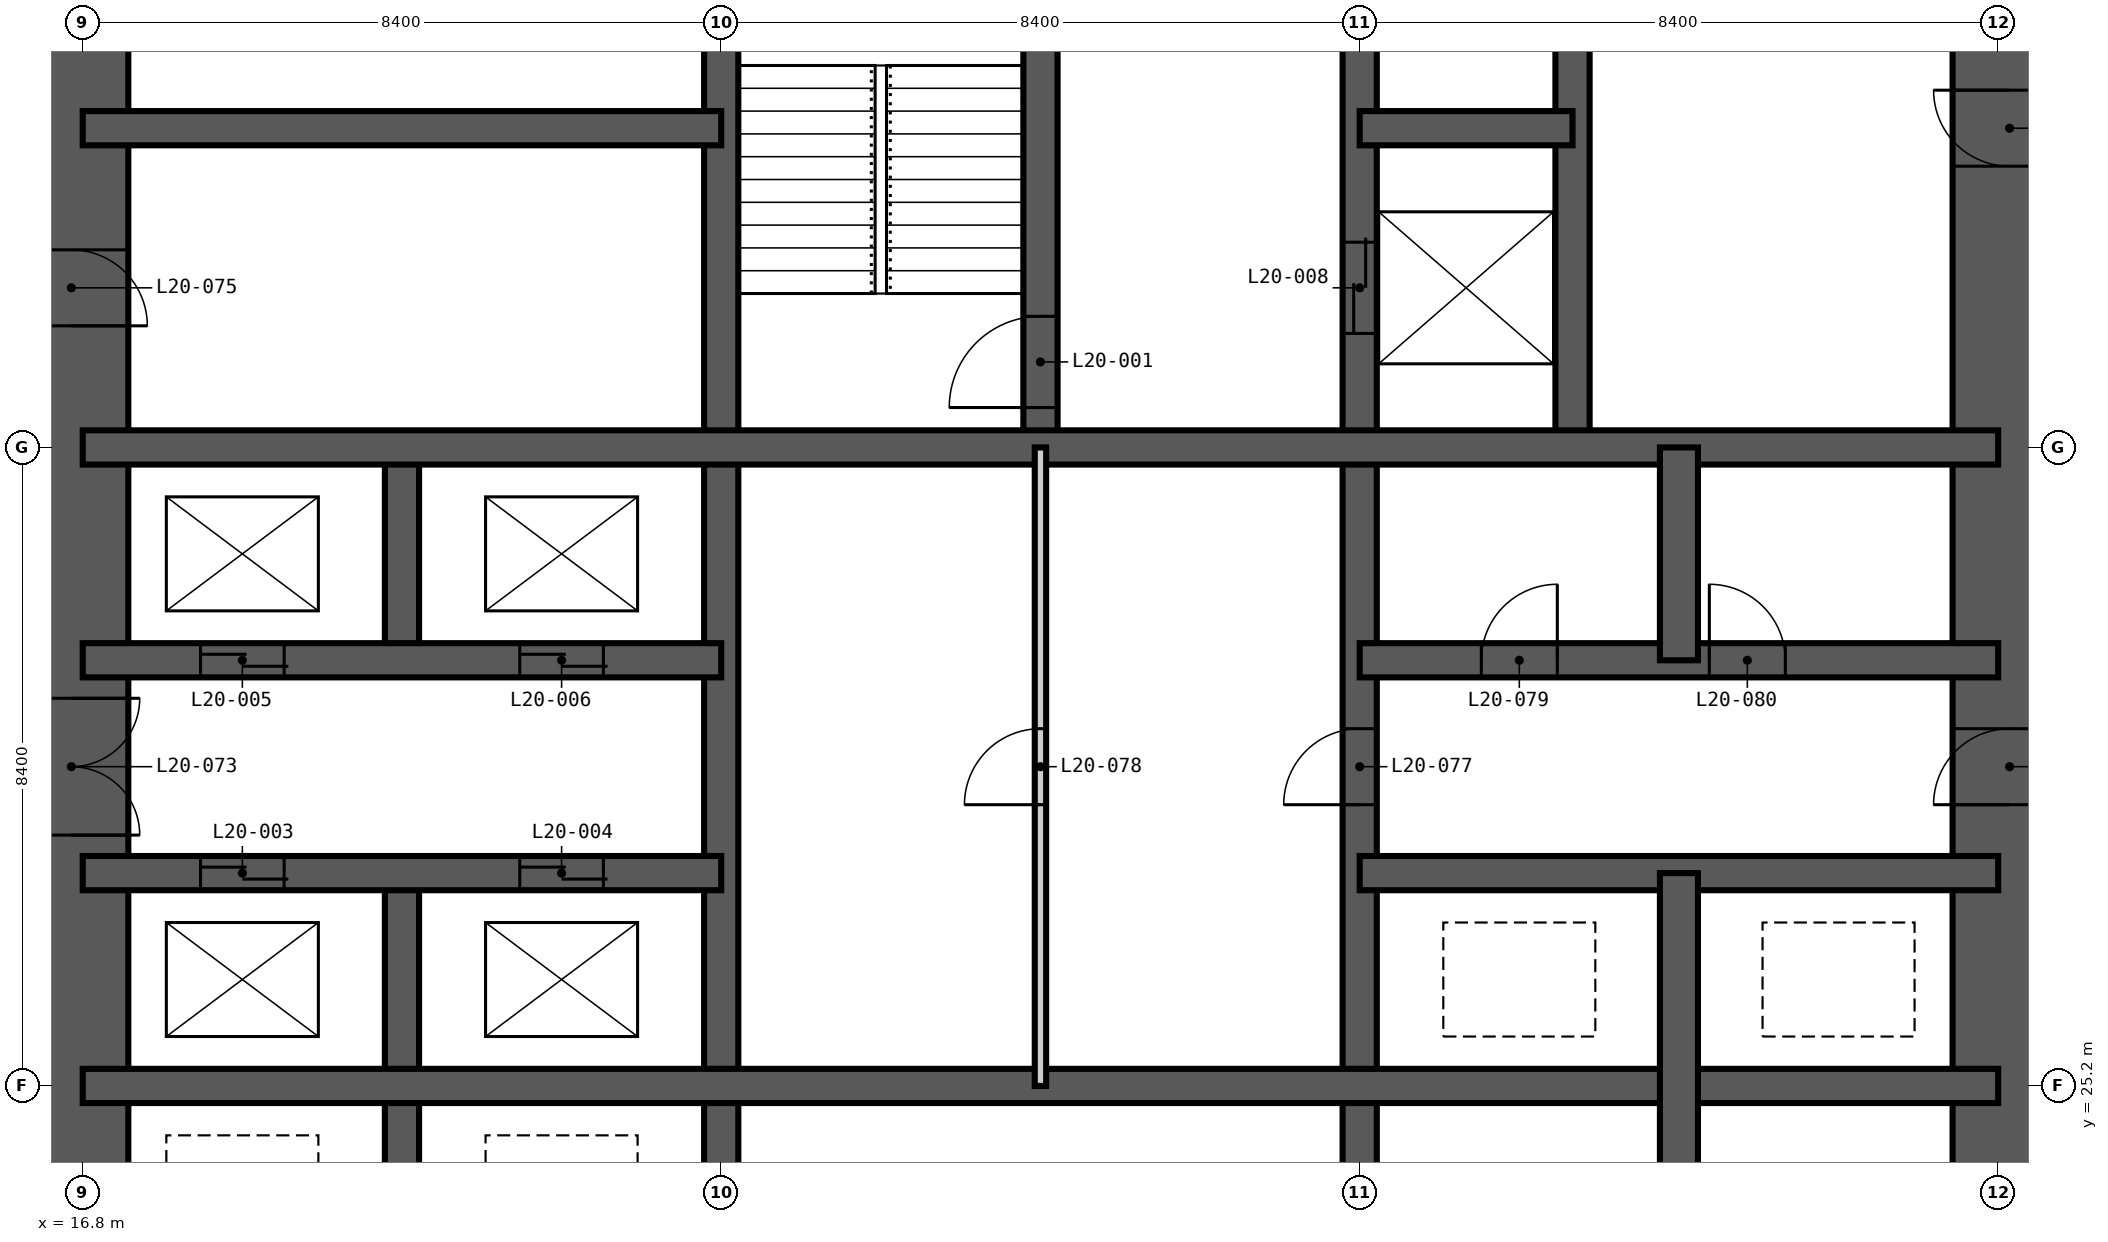
"""IFC4 building model, lengths in metres.
Left out: names, types, materials, properties, quantities, classifications, styles, units other than length and angle.
Written with IfcOpenShell. Run it as: python <this file> out.ifc"""

import sys

from ifc_helpers import new_model, si_unit, direction, frame, frame_2d, origin, place, context, subcontext, project, spatial, rectangle, extrude, element, fill, save


model = new_model("IFC4")
c1 = context("Model", 3, precision=1e-05, world=origin(), true_north=direction((0.0, 1.0)))
c2 = subcontext(c1, "Body", "Model", "MODEL_VIEW")
j1 = project(units=[si_unit("LENGTHUNIT", "METRE"), si_unit("PLANEANGLEUNIT", "RADIAN")], contexts=[c1])
p1 = place(None, origin())
s1 = spatial("IfcSite", under=j1, at=p1, CompositionType="ELEMENT")
p2 = place(p1, origin())
s2 = spatial("IfcBuilding", under=s1, at=p2, CompositionType="ELEMENT")
p3 = place(p2, frame((0.0, 0.0, 81.0)))
s3 = spatial("IfcBuildingStorey", under=s2, at=p3, CompositionType="ELEMENT", Elevation=81.0)
p4 = place(p3, frame((42.15, 17.4, -0.35), z_axis=(0.0, 0.0, 1.0), x_axis=(0.0, 1.0, 0.0)))
e1 = element("IfcWall", 1, at=p4, inside=s3, PredefinedType="SHEAR", context=c2, shape_type="SweptSolid", body=[
    extrude(rectangle(XDim=24.0, YDim=1.5, at=frame_2d((12.0, 0.0))), origin(), (0.0, 0.0, 1.0), 3.6),
])
p5 = place(p4, frame((0.2, 0.0, 0.35)))
e2 = element("IfcOpeningElement", 2, at=p5, cuts=e1, PredefinedType="OPENING", context=c2, shape_type="SweptSolid", body=[
    extrude(rectangle(XDim=1.2, YDim=2.2, at=frame_2d((0.6, 1.1))), frame((0.0, 0.76, 0.0), z_axis=(0.0, -1.0, 0.0), x_axis=(1.0, 0.0, 0.0)), (0.0, 0.0, 1.0), 1.52),
])
p6 = place(p4, frame((11.5, 0.0, 0.35)))
e3 = element("IfcOpeningElement", 3, at=p6, cuts=e1, PredefinedType="OPENING", context=c2, shape_type="SweptSolid", body=[
    extrude(rectangle(XDim=1.0, YDim=2.1, at=frame_2d((0.5, 1.05))), frame((0.0, 0.76, 0.0), z_axis=(0.0, -1.0, 0.0), x_axis=(1.0, 0.0, 0.0)), (0.0, 0.0, 1.0), 1.52),
])
p7 = place(p4, frame((19.9, 0.0, 0.35)))
e4 = element("IfcOpeningElement", 4, at=p7, cuts=e1, PredefinedType="OPENING", context=c2, shape_type="SweptSolid", body=[
    extrude(rectangle(XDim=1.0, YDim=2.1, at=frame_2d((0.5, 1.05))), frame((0.0, 0.76, 0.0), z_axis=(0.0, -1.0, 0.0), x_axis=(1.0, 0.0, 0.0)), (0.0, 0.0, 1.0), 1.52),
])
p8 = place(p3, frame((16.65, 41.4, -0.35), z_axis=(0.0, 0.0, 1.0), x_axis=(0.0, -1.0, 0.0)))
e5 = element("IfcWall", 5, at=p8, inside=s3, PredefinedType="SHEAR", context=c2, shape_type="SweptSolid", body=[
    extrude(rectangle(XDim=24.0, YDim=1.5, at=frame_2d((12.0, 0.0))), origin(), (0.0, 0.0, 1.0), 3.6),
])
p9 = place(p8, frame((11.1, 0.0, 0.35)))
e6 = element("IfcOpeningElement", 6, at=p9, cuts=e5, PredefinedType="OPENING", context=c2, shape_type="SweptSolid", body=[
    extrude(rectangle(XDim=1.8, YDim=2.2, at=frame_2d((0.9, 1.1))), frame((0.0, 0.76, 0.0), z_axis=(0.0, -1.0, 0.0), x_axis=(1.0, 0.0, 0.0)), (0.0, 0.0, 1.0), 1.52),
])
p10 = place(p8, frame((19.9, 0.0, 0.35)))
e7 = element("IfcOpeningElement", 7, at=p10, cuts=e5, PredefinedType="OPENING", context=c2, shape_type="SweptSolid", body=[
    extrude(rectangle(XDim=1.0, YDim=2.1, at=frame_2d((0.5, 1.05))), frame((0.0, 0.76, 0.0), z_axis=(0.0, -1.0, 0.0), x_axis=(1.0, 0.0, 0.0)), (0.0, 0.0, 1.0), 1.52),
])
p11 = place(p8, frame((5.2, 0.0, 0.35)))
e8 = element("IfcOpeningElement", 8, at=p11, cuts=e5, PredefinedType="OPENING", context=c2, shape_type="SweptSolid", body=[
    extrude(rectangle(XDim=1.0, YDim=2.1, at=frame_2d((0.5, 1.05))), frame((0.0, 0.76, 0.0), z_axis=(0.0, -1.0, 0.0), x_axis=(1.0, 0.0, 0.0)), (0.0, 0.0, 1.0), 1.52),
])
p12 = place(p3, frame((21.0, 22.4, -0.35), z_axis=(0.0, 0.0, 1.0), x_axis=(0.0, 1.0, 0.0)))
e9 = element("IfcWall", 9, at=p12, inside=s3, PredefinedType="SHEAR", context=c2, shape_type="SweptSolid", body=[
    extrude(rectangle(XDim=5.6, YDim=0.45, at=frame_2d((2.8, 0.0))), origin(), (0.0, 0.0, 1.0), 3.6),
])
p13 = place(p3, frame((21.0, 30.8, -0.35), z_axis=(0.0, 0.0, 1.0), x_axis=(0.0, 1.0, 0.0)))
e10 = element("IfcWall", 10, at=p13, inside=s3, PredefinedType="SHEAR", context=c2, shape_type="SweptSolid", body=[
    extrude(rectangle(XDim=2.8, YDim=0.45, at=frame_2d((1.4, 0.0))), origin(), (0.0, 0.0, 1.0), 3.6),
])
p14 = place(p3, frame((25.2, 16.8, -0.35), z_axis=(0.0, 0.0, 1.0), x_axis=(0.0, 1.0, 0.0)))
e11 = element("IfcWall", 11, at=p14, inside=s3, PredefinedType="SHEAR", context=c2, shape_type="SweptSolid", body=[
    extrude(rectangle(XDim=25.2, YDim=0.45, at=frame_2d((12.6, 0.0))), origin(), (0.0, 0.0, 1.0), 3.6),
])
p15 = place(p3, frame((29.4, 33.6, -0.35), z_axis=(0.0, 0.0, 1.0), x_axis=(0.0, 1.0, 0.0)))
e12 = element("IfcWall", 12, at=p15, inside=s3, PredefinedType="SHEAR", context=c2, shape_type="SweptSolid", body=[
    extrude(rectangle(XDim=8.4, YDim=0.45, at=frame_2d((4.2, 0.0))), origin(), (0.0, 0.0, 1.0), 3.6),
])
p16 = place(p15, frame((0.525, 0.0, 0.35)))
e13 = element("IfcOpeningElement", 13, at=p16, cuts=e12, PredefinedType="OPENING", context=c2, shape_type="SweptSolid", body=[
    extrude(rectangle(XDim=1.2, YDim=2.2, at=frame_2d((0.6, 1.1))), frame((0.0, 0.235, 0.0), z_axis=(0.0, -1.0, 0.0), x_axis=(1.0, 0.0, 0.0)), (0.0, 0.0, 1.0), 0.47),
])
p17 = place(p3, frame((33.6, 16.8, -0.35), z_axis=(0.0, 0.0, 1.0), x_axis=(0.0, 1.0, 0.0)))
e14 = element("IfcWall", 14, at=p17, inside=s3, PredefinedType="SHEAR", context=c2, shape_type="SweptSolid", body=[
    extrude(rectangle(XDim=25.2, YDim=0.45, at=frame_2d((12.6, 0.0))), origin(), (0.0, 0.0, 1.0), 3.6),
])
p18 = place(p17, frame((22.5, 0.0, 0.35)))
e15 = element("IfcOpeningElement", 15, at=p18, cuts=e14, PredefinedType="OPENING", context=c2, shape_type="SweptSolid", body=[
    extrude(rectangle(XDim=1.2, YDim=2.2, at=frame_2d((0.6, 1.1))), frame((0.0, 0.235, 0.0), z_axis=(0.0, -1.0, 0.0), x_axis=(1.0, 0.0, 0.0)), (0.0, 0.0, 1.0), 0.47),
])
p19 = place(p17, frame((18.3, 0.0, 0.35)))
e16 = element("IfcOpeningElement", 16, at=p19, cuts=e14, PredefinedType="OPENING", context=c2, shape_type="SweptSolid", body=[
    extrude(rectangle(XDim=1.2, YDim=2.2, at=frame_2d((0.6, 1.1))), frame((0.0, 0.235, 0.0), z_axis=(0.0, -1.0, 0.0), x_axis=(1.0, 0.0, 0.0)), (0.0, 0.0, 1.0), 0.47),
])
p20 = place(p17, frame((12.1, 0.0, 0.35)))
e17 = element("IfcOpeningElement", 17, at=p20, cuts=e14, PredefinedType="OPENING", context=c2, shape_type="SweptSolid", body=[
    extrude(rectangle(XDim=1.0, YDim=2.1, at=frame_2d((0.5, 1.05))), frame((0.0, 0.235, 0.0), z_axis=(0.0, -1.0, 0.0), x_axis=(1.0, 0.0, 0.0)), (0.0, 0.0, 1.0), 0.47),
])
p21 = place(p3, frame((36.4, 33.6, -0.35), z_axis=(0.0, 0.0, 1.0), x_axis=(0.0, 1.0, 0.0)))
e18 = element("IfcWall", 18, at=p21, inside=s3, PredefinedType="SHEAR", context=c2, shape_type="SweptSolid", body=[
    extrude(rectangle(XDim=8.4, YDim=0.45, at=frame_2d((4.2, 0.0))), origin(), (0.0, 0.0, 1.0), 3.6),
])
p22 = place(p3, frame((16.8, 25.2, -0.35), z_axis=(0.0, 0.0, 1.0), x_axis=(1.0, 0.0, 0.0)))
e19 = element("IfcWall", 19, at=p22, inside=s3, PredefinedType="SHEAR", context=c2, shape_type="SweptSolid", body=[
    extrude(rectangle(XDim=25.2, YDim=0.45, at=frame_2d((12.6, 0.0))), origin(), (0.0, 0.0, 1.0), 3.6),
])
p23 = place(p3, frame((16.8, 28.0, -0.35), z_axis=(0.0, 0.0, 1.0), x_axis=(1.0, 0.0, 0.0)))
e20 = element("IfcWall", 20, at=p23, inside=s3, PredefinedType="SHEAR", context=c2, shape_type="SweptSolid", body=[
    extrude(rectangle(XDim=8.4, YDim=0.45, at=frame_2d((4.2, 0.0))), origin(), (0.0, 0.0, 1.0), 3.6),
])
p24 = place(p23, frame((1.55, 0.0, 0.35)))
e21 = element("IfcOpeningElement", 21, at=p24, cuts=e20, PredefinedType="OPENING", context=c2, shape_type="SweptSolid", body=[
    extrude(rectangle(XDim=1.1, YDim=2.2, at=frame_2d((0.55, 1.1))), frame((0.0, 0.235, 0.0), z_axis=(0.0, -1.0, 0.0), x_axis=(1.0, 0.0, 0.0)), (0.0, 0.0, 1.0), 0.47),
])
p25 = place(p23, frame((5.75, 0.0, 0.35)))
e22 = element("IfcOpeningElement", 22, at=p25, cuts=e20, PredefinedType="OPENING", context=c2, shape_type="SweptSolid", body=[
    extrude(rectangle(XDim=1.1, YDim=2.2, at=frame_2d((0.55, 1.1))), frame((0.0, 0.235, 0.0), z_axis=(0.0, -1.0, 0.0), x_axis=(1.0, 0.0, 0.0)), (0.0, 0.0, 1.0), 0.47),
])
p26 = place(p3, frame((33.6, 28.0, -0.35), z_axis=(0.0, 0.0, 1.0), x_axis=(1.0, 0.0, 0.0)))
e23 = element("IfcWall", 23, at=p26, inside=s3, PredefinedType="SHEAR", context=c2, shape_type="SweptSolid", body=[
    extrude(rectangle(XDim=8.4, YDim=0.45, at=frame_2d((4.2, 0.0))), origin(), (0.0, 0.0, 1.0), 3.6),
])
p27 = place(p3, frame((16.8, 30.8, -0.35), z_axis=(0.0, 0.0, 1.0), x_axis=(1.0, 0.0, 0.0)))
e24 = element("IfcWall", 24, at=p27, inside=s3, PredefinedType="SHEAR", context=c2, shape_type="SweptSolid", body=[
    extrude(rectangle(XDim=8.4, YDim=0.45, at=frame_2d((4.2, 0.0))), origin(), (0.0, 0.0, 1.0), 3.6),
])
p28 = place(p27, frame((1.55, 0.0, 0.35)))
e25 = element("IfcOpeningElement", 25, at=p28, cuts=e24, PredefinedType="OPENING", context=c2, shape_type="SweptSolid", body=[
    extrude(rectangle(XDim=1.1, YDim=2.2, at=frame_2d((0.55, 1.1))), frame((0.0, 0.235, 0.0), z_axis=(0.0, -1.0, 0.0), x_axis=(1.0, 0.0, 0.0)), (0.0, 0.0, 1.0), 0.47),
])
p29 = place(p27, frame((5.75, 0.0, 0.35)))
e26 = element("IfcOpeningElement", 26, at=p29, cuts=e24, PredefinedType="OPENING", context=c2, shape_type="SweptSolid", body=[
    extrude(rectangle(XDim=1.1, YDim=2.2, at=frame_2d((0.55, 1.1))), frame((0.0, 0.235, 0.0), z_axis=(0.0, -1.0, 0.0), x_axis=(1.0, 0.0, 0.0)), (0.0, 0.0, 1.0), 0.47),
])
p30 = place(p3, frame((33.6, 30.8, -0.35), z_axis=(0.0, 0.0, 1.0), x_axis=(1.0, 0.0, 0.0)))
e27 = element("IfcWall", 27, at=p30, inside=s3, PredefinedType="SHEAR", context=c2, shape_type="SweptSolid", body=[
    extrude(rectangle(XDim=8.4, YDim=0.45, at=frame_2d((4.2, 0.0))), origin(), (0.0, 0.0, 1.0), 3.6),
])
p31 = place(p30, frame((1.6, 0.0, 0.35)))
e28 = element("IfcOpeningElement", 28, at=p31, cuts=e27, PredefinedType="OPENING", context=c2, shape_type="SweptSolid", body=[
    extrude(rectangle(XDim=1.0, YDim=2.1, at=frame_2d((0.5, 1.05))), frame((0.0, 0.235, 0.0), z_axis=(0.0, -1.0, 0.0), x_axis=(1.0, 0.0, 0.0)), (0.0, 0.0, 1.0), 0.47),
])
p32 = place(p30, frame((4.6, 0.0, 0.35)))
e29 = element("IfcOpeningElement", 29, at=p32, cuts=e27, PredefinedType="OPENING", context=c2, shape_type="SweptSolid", body=[
    extrude(rectangle(XDim=1.0, YDim=2.1, at=frame_2d((0.5, 1.05))), frame((0.0, 0.235, 0.0), z_axis=(0.0, -1.0, 0.0), x_axis=(1.0, 0.0, 0.0)), (0.0, 0.0, 1.0), 0.47),
])
p33 = place(p3, frame((16.8, 33.6, -0.35), z_axis=(0.0, 0.0, 1.0), x_axis=(1.0, 0.0, 0.0)))
e30 = element("IfcWall", 30, at=p33, inside=s3, PredefinedType="SHEAR", context=c2, shape_type="SweptSolid", body=[
    extrude(rectangle(XDim=25.2, YDim=0.45, at=frame_2d((12.6, 0.0))), origin(), (0.0, 0.0, 1.0), 3.6),
])
p34 = place(p3, frame((16.8, 37.8, -0.35), z_axis=(0.0, 0.0, 1.0), x_axis=(1.0, 0.0, 0.0)))
e31 = element("IfcWall", 31, at=p34, inside=s3, PredefinedType="SHEAR", context=c2, shape_type="SweptSolid", body=[
    extrude(rectangle(XDim=8.4, YDim=0.45, at=frame_2d((4.2, 0.0))), origin(), (0.0, 0.0, 1.0), 3.6),
])
p35 = place(p3, frame((33.6, 37.8, -0.35), z_axis=(0.0, 0.0, 1.0), x_axis=(1.0, 0.0, 0.0)))
e32 = element("IfcWall", 32, at=p35, inside=s3, PredefinedType="SHEAR", context=c2, shape_type="SweptSolid", body=[
    extrude(rectangle(XDim=2.8, YDim=0.45, at=frame_2d((1.4, 0.0))), origin(), (0.0, 0.0, 1.0), 3.6),
])
p36 = place(p3, frame((37.8, 16.8, -0.35), z_axis=(0.0, 0.0, 1.0), x_axis=(0.0, 1.0, 0.0)))
e33 = element("IfcWall", 33, at=p36, inside=s3, PredefinedType="SHEAR", context=c2, shape_type="SweptSolid", body=[
    extrude(rectangle(XDim=11.2, YDim=0.5, at=frame_2d((5.6, 0.0))), origin(), (0.0, 0.0, 1.0), 3.6),
])
p37 = place(p3, frame((37.8, 30.8, -0.35), z_axis=(0.0, 0.0, 1.0), x_axis=(0.0, 1.0, 0.0)))
e34 = element("IfcWall", 34, at=p37, inside=s3, PredefinedType="SHEAR", context=c2, shape_type="SweptSolid", body=[
    extrude(rectangle(XDim=2.8, YDim=0.5, at=frame_2d((1.4, 0.0))), origin(), (0.0, 0.0, 1.0), 3.6),
])
p38 = place(p3, frame((29.4, 25.2, 0.0), z_axis=(0.0, 0.0, 1.0), x_axis=(0.0, 1.0, 0.0)))
e35 = element("IfcWall", 35, at=p38, inside=s3, PredefinedType="PARTITIONING", context=c2, shape_type="SweptSolid", body=[
    extrude(rectangle(XDim=8.4, YDim=0.15, at=frame_2d((4.2, 0.0))), origin(), (0.0, 0.0, 1.0), 3.25),
])
p39 = place(p38, frame((3.7, 0.0, 0.0)))
e36 = element("IfcOpeningElement", 36, at=p39, cuts=e35, PredefinedType="OPENING", context=c2, shape_type="SweptSolid", body=[
    extrude(rectangle(XDim=1.0, YDim=2.1, at=frame_2d((0.5, 1.05))), frame((0.0, 0.085, 0.0), z_axis=(0.0, -1.0, 0.0), x_axis=(1.0, 0.0, 0.0)), (0.0, 0.0, 1.0), 0.17),
])
p40 = place(p16, origin())
e37 = element("IfcDoor", 37, at=p40, inside=s3, OperationType="SINGLE_SWING_LEFT", PredefinedType="DOOR", context=c2, shape_type="SweptSolid", body=[
    extrude(rectangle(XDim=1.2, YDim=2.2, at=frame_2d((0.6, 1.1))), frame((0.0, 0.025, 0.0), z_axis=(0.0, -1.0, 0.0), x_axis=(1.0, 0.0, 0.0)), (0.0, 0.0, 1.0), 0.05),
])
fill(e13, e37)
p41 = place(p24, origin())
e38 = element("IfcDoor", 38, at=p41, inside=s3, OperationType="DOUBLE_DOOR_SLIDING", PredefinedType="DOOR", context=c2, shape_type="SweptSolid", body=[
    extrude(rectangle(XDim=1.1, YDim=2.2, at=frame_2d((0.55, 1.1))), frame((0.0, 0.025, 0.0), z_axis=(0.0, -1.0, 0.0), x_axis=(1.0, 0.0, 0.0)), (0.0, 0.0, 1.0), 0.05),
])
fill(e21, e38)
p42 = place(p25, origin())
e39 = element("IfcDoor", 39, at=p42, inside=s3, OperationType="DOUBLE_DOOR_SLIDING", PredefinedType="DOOR", context=c2, shape_type="SweptSolid", body=[
    extrude(rectangle(XDim=1.1, YDim=2.2, at=frame_2d((0.55, 1.1))), frame((0.0, 0.025, 0.0), z_axis=(0.0, -1.0, 0.0), x_axis=(1.0, 0.0, 0.0)), (0.0, 0.0, 1.0), 0.05),
])
fill(e22, e39)
p43 = place(p28, origin())
e40 = element("IfcDoor", 40, at=p43, inside=s3, OperationType="DOUBLE_DOOR_SLIDING", PredefinedType="DOOR", context=c2, shape_type="SweptSolid", body=[
    extrude(rectangle(XDim=1.1, YDim=2.2, at=frame_2d((0.55, 1.1))), frame((0.0, 0.025, 0.0), z_axis=(0.0, -1.0, 0.0), x_axis=(1.0, 0.0, 0.0)), (0.0, 0.0, 1.0), 0.05),
])
fill(e25, e40)
p44 = place(p29, origin())
e41 = element("IfcDoor", 41, at=p44, inside=s3, OperationType="DOUBLE_DOOR_SLIDING", PredefinedType="DOOR", context=c2, shape_type="SweptSolid", body=[
    extrude(rectangle(XDim=1.1, YDim=2.2, at=frame_2d((0.55, 1.1))), frame((0.0, 0.025, 0.0), z_axis=(0.0, -1.0, 0.0), x_axis=(1.0, 0.0, 0.0)), (0.0, 0.0, 1.0), 0.05),
])
fill(e26, e41)
p45 = place(p19, origin())
e42 = element("IfcDoor", 42, at=p45, inside=s3, OperationType="DOUBLE_DOOR_SLIDING", PredefinedType="DOOR", context=c2, shape_type="SweptSolid", body=[
    extrude(rectangle(XDim=1.2, YDim=2.2, at=frame_2d((0.6, 1.1))), frame((0.0, 0.025, 0.0), z_axis=(0.0, -1.0, 0.0), x_axis=(1.0, 0.0, 0.0)), (0.0, 0.0, 1.0), 0.05),
])
fill(e16, e42)
p46 = place(p9, origin())
e43 = element("IfcDoor", 43, at=p46, inside=s3, OperationType="DOUBLE_DOOR_DOUBLE_SWING", PredefinedType="DOOR", context=c2, shape_type="SweptSolid", body=[
    extrude(rectangle(XDim=1.8, YDim=2.2, at=frame_2d((0.9, 1.1))), frame((0.0, 0.025, 0.0), z_axis=(0.0, -1.0, 0.0), x_axis=(1.0, 0.0, 0.0)), (0.0, 0.0, 1.0), 0.05),
])
fill(e6, e43)
p47 = place(p11, origin())
e44 = element("IfcDoor", 44, at=p47, inside=s3, OperationType="SINGLE_SWING_RIGHT", PredefinedType="DOOR", context=c2, shape_type="SweptSolid", body=[
    extrude(rectangle(XDim=1.0, YDim=2.1, at=frame_2d((0.5, 1.05))), frame((0.0, 0.025, 0.0), z_axis=(0.0, -1.0, 0.0), x_axis=(1.0, 0.0, 0.0)), (0.0, 0.0, 1.0), 0.05),
])
fill(e8, e44)
p48 = place(p20, origin())
e45 = element("IfcDoor", 45, at=p48, inside=s3, OperationType="SINGLE_SWING_LEFT", PredefinedType="DOOR", context=c2, shape_type="SweptSolid", body=[
    extrude(rectangle(XDim=1.0, YDim=2.1, at=frame_2d((0.5, 1.05))), frame((0.0, 0.025, 0.0), z_axis=(0.0, -1.0, 0.0), x_axis=(1.0, 0.0, 0.0)), (0.0, 0.0, 1.0), 0.05),
])
fill(e17, e45)
p49 = place(p39, origin())
e46 = element("IfcDoor", 46, at=p49, inside=s3, OperationType="SINGLE_SWING_LEFT", PredefinedType="DOOR", context=c2, shape_type="SweptSolid", body=[
    extrude(rectangle(XDim=1.0, YDim=2.1, at=frame_2d((0.5, 1.05))), frame((0.0, 0.025, 0.0), z_axis=(0.0, -1.0, 0.0), x_axis=(1.0, 0.0, 0.0)), (0.0, 0.0, 1.0), 0.05),
])
fill(e36, e46)
p50 = place(p31, origin())
e47 = element("IfcDoor", 47, at=p50, inside=s3, OperationType="SINGLE_SWING_RIGHT", PredefinedType="DOOR", context=c2, shape_type="SweptSolid", body=[
    extrude(rectangle(XDim=1.0, YDim=2.1, at=frame_2d((0.5, 1.05))), frame((0.0, 0.025, 0.0), z_axis=(0.0, -1.0, 0.0), x_axis=(1.0, 0.0, 0.0)), (0.0, 0.0, 1.0), 0.05),
])
fill(e28, e47)
p51 = place(p32, origin())
e48 = element("IfcDoor", 48, at=p51, inside=s3, OperationType="SINGLE_SWING_LEFT", PredefinedType="DOOR", context=c2, shape_type="SweptSolid", body=[
    extrude(rectangle(XDim=1.0, YDim=2.1, at=frame_2d((0.5, 1.05))), frame((0.0, 0.025, 0.0), z_axis=(0.0, -1.0, 0.0), x_axis=(1.0, 0.0, 0.0)), (0.0, 0.0, 1.0), 0.05),
])
fill(e29, e48)
p52 = place(p6, origin())
e49 = element("IfcDoor", 49, at=p52, inside=s3, OperationType="SINGLE_SWING_LEFT", PredefinedType="DOOR", context=c2, shape_type="SweptSolid", body=[
    extrude(rectangle(XDim=1.0, YDim=2.1, at=frame_2d((0.5, 1.05))), frame((0.0, 0.025, 0.0), z_axis=(0.0, -1.0, 0.0), x_axis=(1.0, 0.0, 0.0)), (0.0, 0.0, 1.0), 0.05),
])
fill(e3, e49)
p53 = place(p7, origin())
e50 = element("IfcDoor", 50, at=p53, inside=s3, OperationType="SINGLE_SWING_RIGHT", PredefinedType="DOOR", context=c2, shape_type="SweptSolid", body=[
    extrude(rectangle(XDim=1.0, YDim=2.1, at=frame_2d((0.5, 1.05))), frame((0.0, 0.025, 0.0), z_axis=(0.0, -1.0, 0.0), x_axis=(1.0, 0.0, 0.0)), (0.0, 0.0, 1.0), 0.05),
])
fill(e4, e50)
save(model, sys.argv[1])
